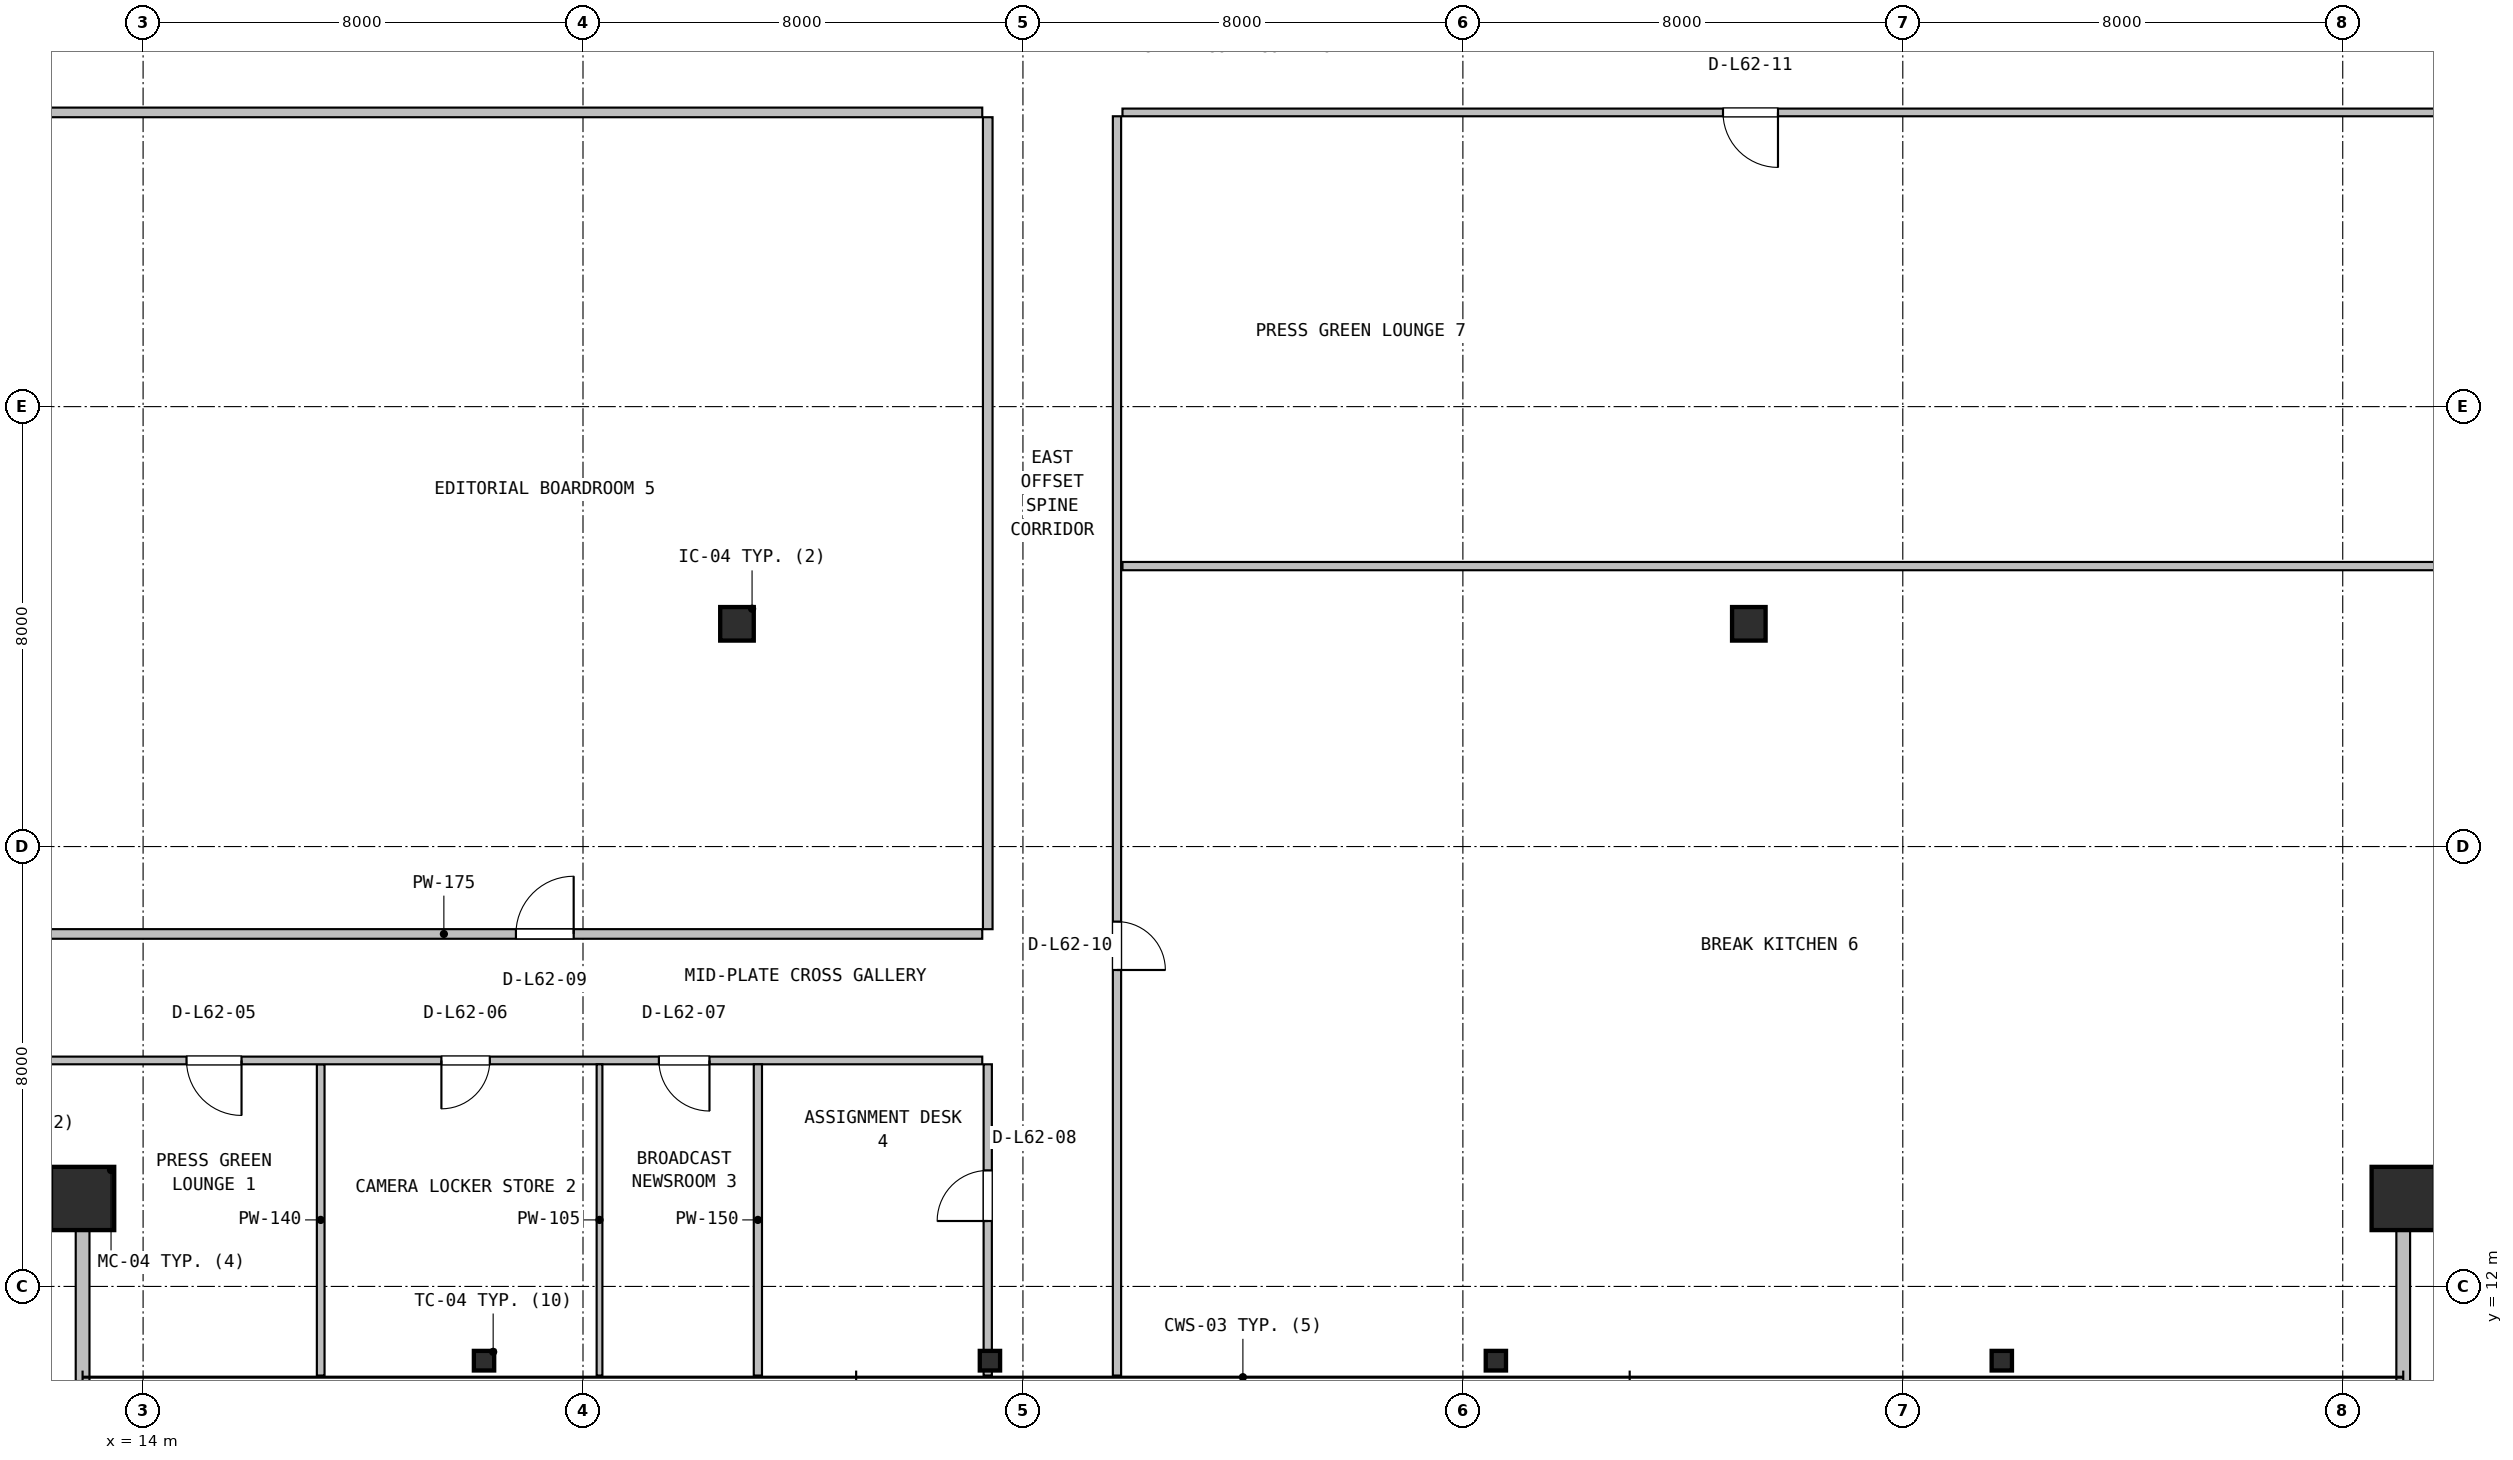
"""IFC4 building model, lengths in metres.
Left out: names, types, materials, properties, quantities, classifications, styles, units other than length and angle.
Written with IfcOpenShell. Run it as: python <this file> out.ifc"""

import sys

from ifc_helpers import new_model, si_unit, direction, frame, frame_2d, origin, origin_2d, place, context, subcontext, project, spatial, rectangle, hollow_rectangle, hollow_circle, i_section, extrude, source, transform, mapped, element, fill, save


model = new_model("IFC4")
c1 = context("Model", 3, precision=1e-05, world=origin(), true_north=direction((0.0, 1.0)))
c2 = subcontext(c1, "Body", "Model", "MODEL_VIEW")
j1 = project(units=[si_unit("LENGTHUNIT", "METRE"), si_unit("PLANEANGLEUNIT", "RADIAN")], contexts=[c1])
p1 = place(None, origin())
s1 = spatial("IfcSite", under=j1, at=p1, CompositionType="ELEMENT")
p2 = place(p1, origin())
s2 = spatial("IfcBuilding", under=s1, at=p2, CompositionType="ELEMENT")
p3 = place(p2, frame((0.0, 0.0, 250.8)))
s3 = spatial("IfcBuildingStorey", under=s2, at=p3, CompositionType="ELEMENT", Elevation=250.8)
m1 = source(origin(), c2, "Body", "SweptSolid", [
    extrude(hollow_rectangle(XDim=1.15, YDim=1.15, WallThickness=0.045, at=origin_2d()), origin(), (0.0, 0.0, 1.0), 3.8),
])
for number, where, z_axis, x_axis in (
    (1, (12.9, 13.6, 0.0), (0.0, 0.0, 1.0), (1.0, 0.0, 0.0)),
    (2, (55.1, 13.6, 0.0), (0.0, 0.0, 1.0), (1.0, 0.0, 0.0)),
):
    element("IfcColumn", number, at=place(p3, frame(where, z_axis=z_axis, x_axis=x_axis)), inside=s3, PredefinedType="COLUMN", context=c2, shape_type="MappedRepresentation", body=[
        mapped(m1, transform((0.0, 0.0, 0.0), x_axis=(1.0, 0.0, 0.0), y_axis=(0.0, 1.0, 0.0), z_axis=(0.0, 0.0, 1.0), scale=1.0)),
    ])
m2 = source(origin(), c2, "Body", "SweptSolid", [
    extrude(i_section(OverallWidth=0.369, OverallDepth=0.356, WebThickness=0.011, FlangeThickness=0.018, FilletRadius=0.016, at=origin_2d()), origin(), (0.0, 0.0, 1.0), 3.8),
])
for number, where, z_axis, x_axis in (
    (3, (20.2, 10.65, 0.0), (0.0, 0.0, 1.0), (1.0, 0.0, 0.0)),
    (4, (29.4, 10.65, 0.0), (0.0, 0.0, 1.0), (1.0, 0.0, 0.0)),
    (5, (38.6, 10.65, 0.0), (0.0, 0.0, 1.0), (1.0, 0.0, 0.0)),
    (6, (47.8, 10.65, 0.0), (0.0, 0.0, 1.0), (1.0, 0.0, 0.0)),
):
    element("IfcColumn", number, at=place(p3, frame(where, z_axis=z_axis, x_axis=x_axis)), inside=s3, PredefinedType="COLUMN", context=c2, shape_type="MappedRepresentation", body=[
        mapped(m2, transform((0.0, 0.0, 0.0), x_axis=(1.0, 0.0, 0.0), y_axis=(0.0, 1.0, 0.0), z_axis=(0.0, 0.0, 1.0), scale=1.0)),
    ])
m3 = source(origin(), c2, "Body", "SweptSolid", [
    extrude(hollow_circle(Radius=0.305, WallThickness=0.025, at=origin_2d()), origin(), (0.0, 0.0, 1.0), 3.8),
])
for number, where, z_axis, x_axis in (
    (7, (24.8, 24.05, 0.0), (0.0, 0.0, 1.0), (1.0, 0.0, 0.0)),
    (8, (43.2, 24.05, 0.0), (0.0, 0.0, 1.0), (1.0, 0.0, 0.0)),
):
    element("IfcColumn", number, at=place(p3, frame(where, z_axis=z_axis, x_axis=x_axis)), inside=s3, PredefinedType="COLUMN", context=c2, shape_type="MappedRepresentation", body=[
        mapped(m3, transform((0.0, 0.0, 0.0), x_axis=(1.0, 0.0, 0.0), y_axis=(0.0, 1.0, 0.0), z_axis=(0.0, 0.0, 1.0), scale=1.0)),
    ])
for number, where, z_axis, x_axis in (
    (9, (12.9, 10.28, 0.0), (0.0, 0.0, 1.0), (0.0, 1.0, 0.0)),
    (10, (55.1, 10.28, 0.0), (0.0, 0.0, 1.0), (0.0, 1.0, 0.0)),
):
    element("IfcWall", number, at=place(p3, frame(where, z_axis=z_axis, x_axis=x_axis)), inside=s3, PredefinedType="SOLIDWALL", context=c2, shape_type="SweptSolid", body=[
        extrude(rectangle(XDim=3.4, YDim=0.25, at=frame_2d((1.7, 0.0))), origin(), (0.0, 0.0, 1.0), 3.171),
    ])
p4 = place(p3, frame((17.23, 10.38, 0.0), z_axis=(0.0, 0.0, 1.0), x_axis=(0.0, 1.0, 0.0)))
e11 = element("IfcWall", 11, at=p4, inside=s3, PredefinedType="PARTITIONING", context=c2, shape_type="SweptSolid", body=[
    extrude(rectangle(XDim=5.66, YDim=0.14, at=frame_2d((2.83, 0.0))), origin(), (0.0, 0.0, 1.0), 3.171),
])
p5 = place(p3, frame((9.68, 16.11, 0.0), z_axis=(0.0, 0.0, 1.0), x_axis=(1.0, 0.0, 0.0)))
e12 = element("IfcWall", 12, at=p5, inside=s3, PredefinedType="PARTITIONING", context=c2, shape_type="SweptSolid", body=[
    extrude(rectangle(XDim=19.58, YDim=0.14, at=frame_2d((9.79, 0.0))), origin(), (0.0, 0.0, 1.0), 2.908),
])
p6 = place(p5, frame((5.11, 0.0, 0.0)))
e13 = element("IfcOpeningElement", 13, at=p6, cuts=e12, PredefinedType="OPENING", context=c2, shape_type="SweptSolid", body=[
    extrude(rectangle(XDim=1.0, YDim=2.1, at=frame_2d((0.5, 1.05))), frame((0.0, 0.08, 0.0), z_axis=(0.0, -1.0, 0.0), x_axis=(1.0, 0.0, 0.0)), (0.0, 0.0, 1.0), 0.16),
])
p7 = place(p5, frame((9.745, 0.0, 0.0)))
e14 = element("IfcOpeningElement", 14, at=p7, cuts=e12, PredefinedType="OPENING", context=c2, shape_type="SweptSolid", body=[
    extrude(rectangle(XDim=0.88, YDim=2.06, at=frame_2d((0.44, 1.03))), frame((0.0, 0.08, 0.0), z_axis=(0.0, -1.0, 0.0), x_axis=(1.0, 0.0, 0.0)), (0.0, 0.0, 1.0), 0.16),
])
p8 = place(p5, frame((13.7, 0.0, 0.0)))
e15 = element("IfcOpeningElement", 15, at=p8, cuts=e12, PredefinedType="OPENING", context=c2, shape_type="SweptSolid", body=[
    extrude(rectangle(XDim=0.92, YDim=2.08, at=frame_2d((0.46, 1.04))), frame((0.0, 0.08, 0.0), z_axis=(0.0, -1.0, 0.0), x_axis=(1.0, 0.0, 0.0)), (0.0, 0.0, 1.0), 0.16),
])
p9 = place(p3, frame((22.3, 10.38, 0.0), z_axis=(0.0, 0.0, 1.0), x_axis=(0.0, 1.0, 0.0)))
e16 = element("IfcWall", 16, at=p9, inside=s3, PredefinedType="PARTITIONING", context=c2, shape_type="SweptSolid", body=[
    extrude(rectangle(XDim=5.66, YDim=0.105, at=frame_2d((2.83, 0.0))), origin(), (0.0, 0.0, 1.0), 3.171),
])
p10 = place(p3, frame((25.18, 10.38, 0.0), z_axis=(0.0, 0.0, 1.0), x_axis=(0.0, 1.0, 0.0)))
e17 = element("IfcWall", 17, at=p10, inside=s3, PredefinedType="PARTITIONING", context=c2, shape_type="SweptSolid", body=[
    extrude(rectangle(XDim=5.66, YDim=0.15, at=frame_2d((2.83, 0.0))), origin(), (0.0, 0.0, 1.0), 3.171),
])
p11 = place(p3, frame((29.36, 10.38, 0.0), z_axis=(0.0, 0.0, 1.0), x_axis=(0.0, 1.0, 0.0)))
e18 = element("IfcWall", 18, at=p11, inside=s3, PredefinedType="PARTITIONING", context=c2, shape_type="SweptSolid", body=[
    extrude(rectangle(XDim=5.66, YDim=0.15, at=frame_2d((2.83, 0.0))), origin(), (0.0, 0.0, 1.0), 2.908),
])
p12 = place(p11, frame((2.81, 0.0, 0.0)))
e19 = element("IfcOpeningElement", 19, at=p12, cuts=e18, PredefinedType="OPENING", context=c2, shape_type="SweptSolid", body=[
    extrude(rectangle(XDim=0.92, YDim=2.08, at=frame_2d((0.46, 1.04))), frame((0.0, 0.085, 0.0), z_axis=(0.0, -1.0, 0.0), x_axis=(1.0, 0.0, 0.0)), (0.0, 0.0, 1.0), 0.17),
])
p13 = place(p3, frame((9.68, 18.41, 0.0), z_axis=(0.0, 0.0, 1.0), x_axis=(1.0, 0.0, 0.0)))
e20 = element("IfcWall", 20, at=p13, inside=s3, PredefinedType="PARTITIONING", context=c2, shape_type="SweptSolid", body=[
    extrude(rectangle(XDim=19.58, YDim=0.175, at=frame_2d((9.79, 0.0))), origin(), (0.0, 0.0, 1.0), 2.908),
])
p14 = place(p13, frame((11.1, 0.0, 0.0)))
e21 = element("IfcOpeningElement", 21, at=p14, cuts=e20, PredefinedType="OPENING", context=c2, shape_type="SweptSolid", body=[
    extrude(rectangle(XDim=1.05, YDim=2.1, at=frame_2d((0.525, 1.05))), frame((0.0, 0.098, 0.0), z_axis=(0.0, -1.0, 0.0), x_axis=(1.0, 0.0, 0.0)), (0.0, 0.0, 1.0), 0.195),
])
p15 = place(p3, frame((29.36, 18.497, 0.0), z_axis=(0.0, 0.0, 1.0), x_axis=(0.0, 1.0, 0.0)))
e22 = element("IfcWall", 22, at=p15, inside=s3, PredefinedType="PARTITIONING", context=c2, shape_type="SweptSolid", body=[
    extrude(rectangle(XDim=14.766, YDim=0.175, at=frame_2d((7.383, 0.0))), origin(), (0.0, 0.0, 1.0), 2.908),
])
p16 = place(p3, frame((9.68, 33.35, 0.0), z_axis=(0.0, 0.0, 1.0), x_axis=(1.0, 0.0, 0.0)))
e23 = element("IfcWall", 23, at=p16, inside=s3, PredefinedType="PARTITIONING", context=c2, shape_type="SweptSolid", body=[
    extrude(rectangle(XDim=19.58, YDim=0.175, at=frame_2d((9.79, 0.0))), origin(), (0.0, 0.0, 1.0), 2.908),
])
p17 = place(p3, frame((31.81, 25.1, 0.0), z_axis=(0.0, 0.0, 1.0), x_axis=(1.0, 0.0, 0.0)))
e24 = element("IfcWall", 24, at=p17, inside=s3, PredefinedType="PARTITIONING", context=c2, shape_type="SweptSolid", body=[
    extrude(rectangle(XDim=26.51, YDim=0.15, at=frame_2d((13.255, 0.0))), origin(), (0.0, 0.0, 1.0), 2.908),
])
p18 = place(p3, frame((31.71, 10.38, 0.0), z_axis=(0.0, 0.0, 1.0), x_axis=(0.0, 1.0, 0.0)))
e25 = element("IfcWall", 25, at=p18, inside=s3, PredefinedType="PARTITIONING", context=c2, shape_type="SweptSolid", body=[
    extrude(rectangle(XDim=22.9, YDim=0.15, at=frame_2d((11.45, 0.0))), origin(), (0.0, 0.0, 1.0), 2.908),
])
p19 = place(p18, frame((7.375, 0.0, 0.0)))
e26 = element("IfcOpeningElement", 26, at=p19, cuts=e25, PredefinedType="OPENING", context=c2, shape_type="SweptSolid", body=[
    extrude(rectangle(XDim=0.88, YDim=2.06, at=frame_2d((0.44, 1.03))), frame((0.0, 0.085, 0.0), z_axis=(0.0, -1.0, 0.0), x_axis=(1.0, 0.0, 0.0)), (0.0, 0.0, 1.0), 0.17),
])
p20 = place(p3, frame((31.81, 33.35, 0.0), z_axis=(0.0, 0.0, 1.0), x_axis=(1.0, 0.0, 0.0)))
e27 = element("IfcWall", 27, at=p20, inside=s3, PredefinedType="PARTITIONING", context=c2, shape_type="SweptSolid", body=[
    extrude(rectangle(XDim=26.51, YDim=0.14, at=frame_2d((13.255, 0.0))), origin(), (0.0, 0.0, 1.0), 2.908),
])
p21 = place(p20, frame((10.92, 0.0, 0.0)))
e28 = element("IfcOpeningElement", 28, at=p21, cuts=e27, PredefinedType="OPENING", context=c2, shape_type="SweptSolid", body=[
    extrude(rectangle(XDim=1.0, YDim=2.1, at=frame_2d((0.5, 1.05))), frame((0.0, 0.08, 0.0), z_axis=(0.0, -1.0, 0.0), x_axis=(1.0, 0.0, 0.0)), (0.0, 0.0, 1.0), 0.16),
])
m4 = source(origin(), c2, "Body", "SweptSolid", [
    extrude(rectangle(XDim=1.0, YDim=2.1, at=frame_2d((0.5, 1.05))), frame((0.0, 0.025, 0.0), z_axis=(0.0, -1.0, 0.0), x_axis=(1.0, 0.0, 0.0)), (0.0, 0.0, 1.0), 0.05),
])
p22 = place(p6, frame((1.0, 0.0, 0.0), z_axis=(0.0, 0.0, 1.0), x_axis=(-1.0, 0.0, 0.0)))
e29 = element("IfcDoor", 29, at=p22, inside=s3, OperationType="SINGLE_SWING_RIGHT", PredefinedType="DOOR", context=c2, shape_type="MappedRepresentation", body=[
    mapped(m4, transform((0.0, 0.0, 0.0), x_axis=(1.0, 0.0, 0.0), y_axis=(0.0, 1.0, 0.0), z_axis=(0.0, 0.0, 1.0), scale=1.0)),
])
fill(e13, e29)
m5 = source(origin(), c2, "Body", "SweptSolid", [
    extrude(rectangle(XDim=0.88, YDim=2.06, at=frame_2d((0.44, 1.03))), frame((0.0, 0.025, 0.0), z_axis=(0.0, -1.0, 0.0), x_axis=(1.0, 0.0, 0.0)), (0.0, 0.0, 1.0), 0.05),
])
p23 = place(p7, frame((0.88, 0.0, 0.0), z_axis=(0.0, 0.0, 1.0), x_axis=(-1.0, 0.0, 0.0)))
e30 = element("IfcDoor", 30, at=p23, inside=s3, OperationType="SINGLE_SWING_LEFT", PredefinedType="DOOR", context=c2, shape_type="MappedRepresentation", body=[
    mapped(m5, transform((0.0, 0.0, 0.0), x_axis=(1.0, 0.0, 0.0), y_axis=(0.0, 1.0, 0.0), z_axis=(0.0, 0.0, 1.0), scale=1.0)),
])
fill(e14, e30)
m6 = source(origin(), c2, "Body", "SweptSolid", [
    extrude(rectangle(XDim=0.92, YDim=2.08, at=frame_2d((0.46, 1.04))), frame((0.0, 0.025, 0.0), z_axis=(0.0, -1.0, 0.0), x_axis=(1.0, 0.0, 0.0)), (0.0, 0.0, 1.0), 0.05),
])
p24 = place(p8, frame((0.92, 0.0, 0.0), z_axis=(0.0, 0.0, 1.0), x_axis=(-1.0, 0.0, 0.0)))
e31 = element("IfcDoor", 31, at=p24, inside=s3, OperationType="SINGLE_SWING_RIGHT", PredefinedType="DOOR", context=c2, shape_type="MappedRepresentation", body=[
    mapped(m6, transform((0.0, 0.0, 0.0), x_axis=(1.0, 0.0, 0.0), y_axis=(0.0, 1.0, 0.0), z_axis=(0.0, 0.0, 1.0), scale=1.0)),
])
fill(e15, e31)
p25 = place(p12, origin())
e32 = element("IfcDoor", 32, at=p25, inside=s3, OperationType="SINGLE_SWING_LEFT", PredefinedType="DOOR", context=c2, shape_type="MappedRepresentation", body=[
    mapped(m6, transform((0.0, 0.0, 0.0), x_axis=(1.0, 0.0, 0.0), y_axis=(0.0, 1.0, 0.0), z_axis=(0.0, 0.0, 1.0), scale=1.0)),
])
fill(e19, e32)
m7 = source(origin(), c2, "Body", "SweptSolid", [
    extrude(rectangle(XDim=1.05, YDim=2.1, at=frame_2d((0.525, 1.05))), frame((0.0, 0.025, 0.0), z_axis=(0.0, -1.0, 0.0), x_axis=(1.0, 0.0, 0.0)), (0.0, 0.0, 1.0), 0.05),
])
p26 = place(p14, origin())
e33 = element("IfcDoor", 33, at=p26, inside=s3, OperationType="SINGLE_SWING_RIGHT", PredefinedType="DOOR", context=c2, shape_type="MappedRepresentation", body=[
    mapped(m7, transform((0.0, 0.0, 0.0), x_axis=(1.0, 0.0, 0.0), y_axis=(0.0, 1.0, 0.0), z_axis=(0.0, 0.0, 1.0), scale=1.0)),
])
fill(e21, e33)
p27 = place(p19, frame((0.88, 0.0, 0.0), z_axis=(0.0, 0.0, 1.0), x_axis=(-1.0, 0.0, 0.0)))
e34 = element("IfcDoor", 34, at=p27, inside=s3, OperationType="SINGLE_SWING_LEFT", PredefinedType="DOOR", context=c2, shape_type="MappedRepresentation", body=[
    mapped(m5, transform((0.0, 0.0, 0.0), x_axis=(1.0, 0.0, 0.0), y_axis=(0.0, 1.0, 0.0), z_axis=(0.0, 0.0, 1.0), scale=1.0)),
])
fill(e26, e34)
p28 = place(p21, frame((1.0, 0.0, 0.0), z_axis=(0.0, 0.0, 1.0), x_axis=(-1.0, 0.0, 0.0)))
e35 = element("IfcDoor", 35, at=p28, inside=s3, OperationType="SINGLE_SWING_RIGHT", PredefinedType="DOOR", context=c2, shape_type="MappedRepresentation", body=[
    mapped(m4, transform((0.0, 0.0, 0.0), x_axis=(1.0, 0.0, 0.0), y_axis=(0.0, 1.0, 0.0), z_axis=(0.0, 0.0, 1.0), scale=1.0)),
])
fill(e28, e35)
save(model, sys.argv[1])
